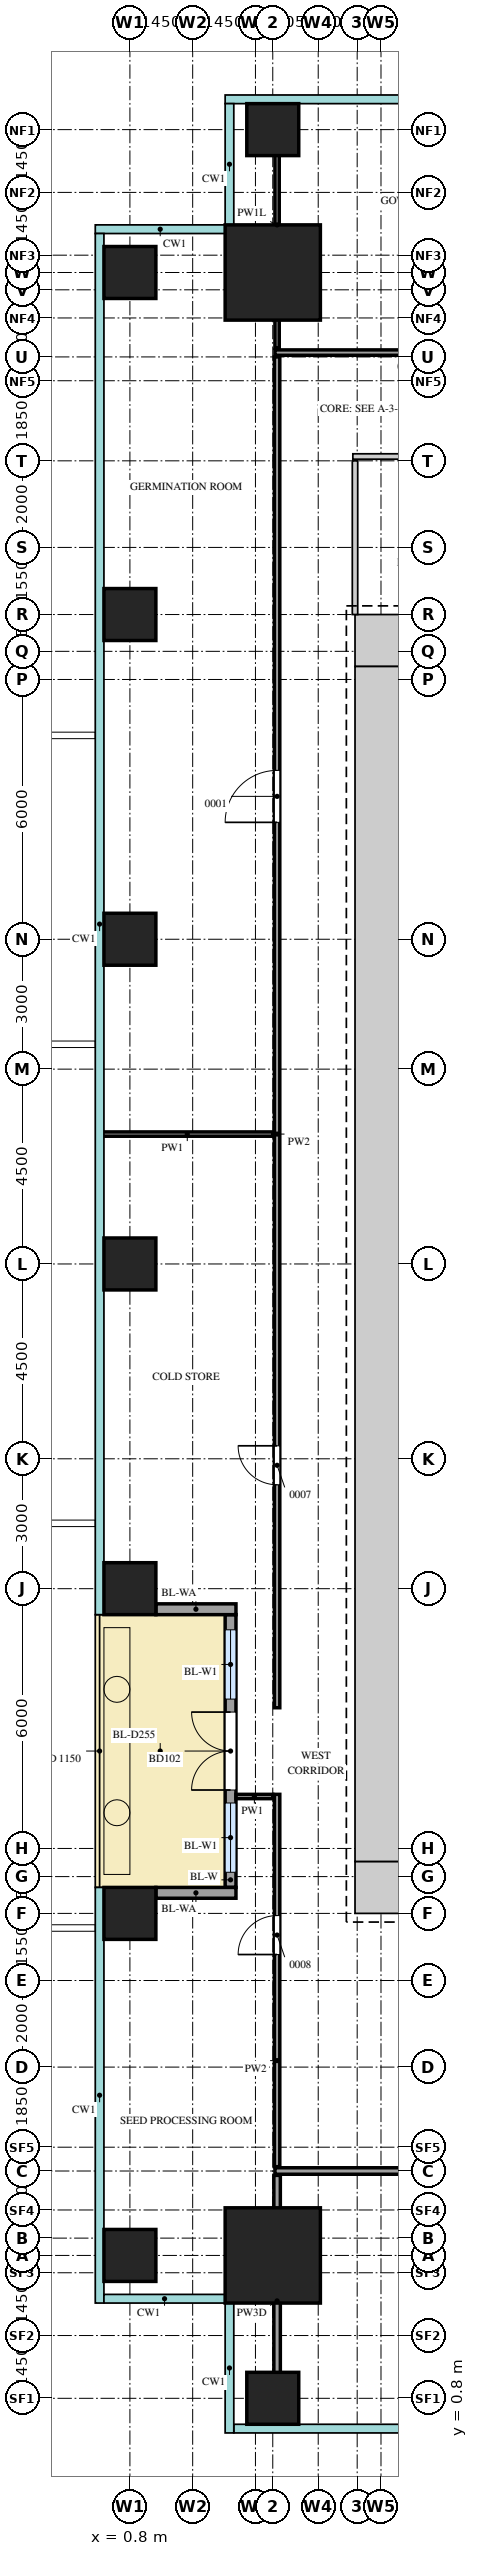
"""IFC4 building model, lengths in metres.
Left out: names, types, materials, properties, quantities, classifications, styles, units other than length and angle.
Written with IfcOpenShell. Run it as: python <this file> out.ifc"""

import sys

from ifc_helpers import new_model, si_unit, direction, frame, frame_2d, origin, origin_2d, place, context, subcontext, project, spatial, rectangle, extrude, source, transform, mapped, element, fill, save


model = new_model("IFC4")
c1 = context("Model", 3, precision=1e-05, world=origin(), true_north=direction((0.0, 1.0)))
c2 = subcontext(c1, "Body", "Model", "MODEL_VIEW")
j1 = project(units=[si_unit("LENGTHUNIT", "METRE"), si_unit("PLANEANGLEUNIT", "RADIAN")], contexts=[c1])
p1 = place(None, origin())
s1 = spatial("IfcSite", under=j1, at=p1, CompositionType="ELEMENT")
p2 = place(p1, origin())
s2 = spatial("IfcBuilding", under=s1, at=p2, CompositionType="ELEMENT")
p3 = place(p2, frame((0.0, 0.0, 51.0)))
s3 = spatial("IfcBuildingStorey", under=s2, at=p3, CompositionType="ELEMENT", Elevation=51.0)
m1 = source(origin(), c2, "Body", "SweptSolid", [
    extrude(rectangle(XDim=1.2, YDim=1.2, at=frame_2d((0.6, 0.0))), origin(), (0.0, 0.0, 1.0), 4.2),
])
for number, where, z_axis, x_axis in (
    (1, (6.0, 41.4, 0.0), (0.0, 0.0, 1.0), (1.0, 0.0, 0.0)),
    (2, (6.0, 12.6, 0.0), (0.0, 0.0, 1.0), (1.0, 0.0, 0.0)),
):
    element("IfcWall", number, at=place(p3, frame(where, z_axis=z_axis, x_axis=x_axis)), inside=s3, PredefinedType="SHEAR", context=c2, shape_type="MappedRepresentation", body=[
        mapped(m1, transform((0.0, 0.0, 0.0))),
    ])
m2 = source(origin(), c2, "Body", "SweptSolid", [
    extrude(rectangle(XDim=27.6, YDim=1.2, at=frame_2d((13.8, 0.0))), origin(), (0.0, 0.0, 1.0), 4.2),
])
p4 = place(p3, frame((6.6, 13.2, 0.0), z_axis=(0.0, 0.0, 1.0), x_axis=(0.0, 1.0, 0.0)))
e3 = element("IfcWall", 3, at=p4, inside=s3, PredefinedType="SHEAR", context=c2, shape_type="MappedRepresentation", body=[
    mapped(m2, transform((0.0, 0.0, 0.0))),
])
m3 = source(origin(), c2, "Body", "SweptSolid", [
    extrude(rectangle(XDim=2.2, YDim=2.2, at=origin_2d()), origin(), (0.0, 0.0, 1.0), 4.5),
])
for number, where, z_axis, x_axis in (
    (4, (4.1, 49.9, 0.0), (0.0, 0.0, 1.0), (1.0, 0.0, 0.0)),
    (5, (4.1, 4.1, 0.0), (0.0, 0.0, 1.0), (1.0, 0.0, 0.0)),
):
    element("IfcColumn", number, at=place(p3, frame(where, z_axis=z_axis, x_axis=x_axis)), inside=s3, PredefinedType="COLUMN", context=c2, shape_type="MappedRepresentation", body=[
        mapped(m3, transform((0.0, 0.0, 0.0))),
    ])
m4 = source(origin(), c2, "Body", "SweptSolid", [
    extrude(rectangle(XDim=1.2, YDim=1.2, at=origin_2d()), origin(), (0.0, 0.0, 1.0), 4.2),
])
for number, where, z_axis, x_axis in (
    (6, (4.1, 0.8, 0.0), (0.0, 0.0, 1.0), (1.0, 0.0, 0.0)),
    (7, (4.1, 53.2, 0.0), (0.0, 0.0, 1.0), (1.0, 0.0, 0.0)),
    (8, (0.8, 4.1, 0.0), (0.0, 0.0, 1.0), (1.0, 0.0, 0.0)),
    (9, (0.8, 12.0, 0.0), (0.0, 0.0, 1.0), (1.0, 0.0, 0.0)),
    (10, (0.8, 19.5, 0.0), (0.0, 0.0, 1.0), (1.0, 0.0, 0.0)),
    (11, (0.8, 27.0, 0.0), (0.0, 0.0, 1.0), (1.0, 0.0, 0.0)),
    (12, (0.8, 34.5, 0.0), (0.0, 0.0, 1.0), (1.0, 0.0, 0.0)),
    (13, (0.8, 42.0, 0.0), (0.0, 0.0, 1.0), (1.0, 0.0, 0.0)),
    (14, (0.8, 49.9, 0.0), (0.0, 0.0, 1.0), (1.0, 0.0, 0.0)),
):
    element("IfcColumn", number, at=place(p3, frame(where, z_axis=z_axis, x_axis=x_axis)), inside=s3, PredefinedType="COLUMN", context=c2, shape_type="MappedRepresentation", body=[
        mapped(m4, transform((0.0, 0.0, 0.0))),
    ])
m5 = source(origin(), c2, "Body", "SweptSolid", [
    extrude(rectangle(XDim=6.3, YDim=0.25, at=frame_2d((3.15, 0.0))), origin(), (0.0, 0.0, 1.0), 4.2),
])
p5 = place(p3, frame((3.125, 12.6, 0.0), z_axis=(0.0, 0.0, 1.0), x_axis=(0.0, 1.0, 0.0)))
e15 = element("IfcWall", 15, at=p5, inside=s3, PredefinedType="SOLIDWALL", context=c2, shape_type="MappedRepresentation", body=[
    mapped(m5, transform((0.0, 0.0, 0.0))),
])
m6 = source(origin(), c2, "Body", "SweptSolid", [
    extrude(rectangle(XDim=1.6, YDim=2.4, at=frame_2d((0.8, 1.2))), frame((0.0, 0.135, 0.0), z_axis=(0.0, -1.0, 0.0), x_axis=(1.0, 0.0, 0.0)), (0.0, 0.0, 1.0), 0.27),
])
p6 = place(p5, frame((0.35, 0.0, 0.0)))
e16 = element("IfcOpeningElement", 16, at=p6, cuts=e15, PredefinedType="OPENING", context=c2, shape_type="MappedRepresentation", body=[
    mapped(m6, transform((0.0, 0.0, 0.0))),
])
p7 = place(p5, frame((4.35, 0.0, 0.0)))
e17 = element("IfcOpeningElement", 17, at=p7, cuts=e15, PredefinedType="OPENING", context=c2, shape_type="MappedRepresentation", body=[
    mapped(m6, transform((0.0, 0.0, 0.0))),
])
m7 = source(origin(), c2, "Body", "SweptSolid", [
    extrude(rectangle(XDim=1.8, YDim=2.4, at=frame_2d((0.9, 1.2))), frame((0.0, 0.135, 0.0), z_axis=(0.0, -1.0, 0.0), x_axis=(1.0, 0.0, 0.0)), (0.0, 0.0, 1.0), 0.27),
])
p8 = place(p5, frame((2.25, 0.0, 0.0)))
e18 = element("IfcOpeningElement", 18, at=p8, cuts=e15, PredefinedType="OPENING", context=c2, shape_type="MappedRepresentation", body=[
    mapped(m7, transform((0.0, 0.0, 0.0))),
])
m8 = source(origin(), c2, "Body", "SweptSolid", [
    extrude(rectangle(XDim=1.85, YDim=0.25, at=frame_2d((0.925, 0.0))), origin(), (0.0, 0.0, 1.0), 3.9),
])
for number, where, z_axis, x_axis in (
    (19, (1.4, 12.475, 0.0), (0.0, 0.0, 1.0), (1.0, 0.0, 0.0)),
    (20, (1.4, 19.025, 0.0), (0.0, 0.0, 1.0), (1.0, 0.0, 0.0)),
):
    element("IfcWall", number, at=place(p3, frame(where, z_axis=z_axis, x_axis=x_axis)), inside=s3, PredefinedType="SOLIDWALL", context=c2, shape_type="MappedRepresentation", body=[
        mapped(m8, transform((0.0, 0.0, 0.0))),
    ])
m9 = source(origin(), c2, "Body", "SweptSolid", [
    extrude(rectangle(XDim=5.8, YDim=0.15, at=frame_2d((2.9, 0.0))), origin(), (0.0, 0.0, 1.0), 3.6),
])
p9 = place(p3, frame((4.2, 0.15, 0.0), z_axis=(0.0, 0.0, 1.0), x_axis=(0.0, 1.0, 0.0)))
e21 = element("IfcWall", 21, at=p9, inside=s3, PredefinedType="PARTITIONING", context=c2, shape_type="MappedRepresentation", body=[
    mapped(m9, transform((0.0, 0.0, 0.0))),
])
m10 = source(origin(), c2, "Body", "SweptSolid", [
    extrude(rectangle(XDim=22.15, YDim=0.15, at=frame_2d((11.075, 0.0))), origin(), (0.0, 0.0, 1.0), 4.3),
])
p10 = place(p3, frame((4.15, 6.05, 0.0), z_axis=(0.0, 0.0, 1.0), x_axis=(1.0, 0.0, 0.0)))
e22 = element("IfcWall", 22, at=p10, inside=s3, PredefinedType="PARTITIONING", context=c2, shape_type="MappedRepresentation", body=[
    mapped(m10, transform((0.0, 0.0, 0.0))),
])
m11 = source(origin(), c2, "Body", "SweptSolid", [
    extrude(rectangle(XDim=1.2, YDim=2.1, at=frame_2d((0.6, 1.05))), frame((0.0, 0.085, 0.0), z_axis=(0.0, -1.0, 0.0), x_axis=(1.0, 0.0, 0.0)), (0.0, 0.0, 1.0), 0.17),
])
p11 = place(p10, frame((9.2, 0.0, 0.0)))
e23 = element("IfcOpeningElement", 23, at=p11, cuts=e22, PredefinedType="OPENING", context=c2, shape_type="MappedRepresentation", body=[
    mapped(m11, transform((0.0, 0.0, 0.0))),
])
m12 = source(origin(), c2, "Body", "SweptSolid", [
    extrude(rectangle(XDim=0.85, YDim=0.1, at=frame_2d((0.425, 0.0))), origin(), (0.0, 0.0, 1.0), 4.3),
])
p12 = place(p3, frame((3.25, 14.7, 0.0), z_axis=(0.0, 0.0, 1.0), x_axis=(1.0, 0.0, 0.0)))
e24 = element("IfcWall", 24, at=p12, inside=s3, PredefinedType="PARTITIONING", context=c2, shape_type="MappedRepresentation", body=[
    mapped(m12, transform((0.0, 0.0, 0.0))),
])
m13 = source(origin(), c2, "Body", "SweptSolid", [
    extrude(rectangle(XDim=3.95, YDim=0.1, at=frame_2d((1.975, 0.0))), origin(), (0.0, 0.0, 1.0), 4.3),
])
p13 = place(p3, frame((0.15, 30.0, 0.0), z_axis=(0.0, 0.0, 1.0), x_axis=(1.0, 0.0, 0.0)))
e25 = element("IfcWall", 25, at=p13, inside=s3, PredefinedType="PARTITIONING", context=c2, shape_type="MappedRepresentation", body=[
    mapped(m13, transform((0.0, 0.0, 0.0))),
])
m14 = source(origin(), c2, "Body", "SweptSolid", [
    extrude(rectangle(XDim=3.55, YDim=0.125, at=frame_2d((1.775, 0.0))), origin(), (0.0, 0.0, 1.0), 4.3),
])
p14 = place(p3, frame((6.0, 42.0, 0.0), z_axis=(0.0, 0.0, 1.0), x_axis=(0.0, 1.0, 0.0)))
e26 = element("IfcWall", 26, at=p14, inside=s3, PredefinedType="PARTITIONING", context=c2, shape_type="MappedRepresentation", body=[
    mapped(m14, transform((0.0, 0.0, 0.0))),
])
m15 = source(origin(), c2, "Body", "SweptSolid", [
    extrude(rectangle(XDim=7.95, YDim=0.125, at=frame_2d((3.975, 0.0))), origin(), (0.0, 0.0, 1.0), 4.3),
])
p15 = place(p3, frame((5.95, 45.65, 0.0), z_axis=(0.0, 0.0, 1.0), x_axis=(1.0, 0.0, 0.0)))
e27 = element("IfcWall", 27, at=p15, inside=s3, PredefinedType="PARTITIONING", context=c2, shape_type="MappedRepresentation", body=[
    mapped(m15, transform((0.0, 0.0, 0.0))),
])
m16 = source(origin(), c2, "Body", "SweptSolid", [
    extrude(rectangle(XDim=0.9, YDim=2.1, at=frame_2d((0.45, 1.05))), frame((0.0, 0.073, 0.0), z_axis=(0.0, -1.0, 0.0), x_axis=(1.0, 0.0, 0.0)), (0.0, 0.0, 1.0), 0.145),
])
p16 = place(p15, frame((1.55, 0.0, 0.0)))
e28 = element("IfcOpeningElement", 28, at=p16, cuts=e27, PredefinedType="OPENING", context=c2, shape_type="MappedRepresentation", body=[
    mapped(m16, transform((0.0, 0.0, 0.0))),
])
p17 = place(p15, frame((5.65, 0.0, 0.0)))
e29 = element("IfcOpeningElement", 29, at=p17, cuts=e27, PredefinedType="OPENING", context=c2, shape_type="MappedRepresentation", body=[
    mapped(m16, transform((0.0, 0.0, 0.0))),
])
m17 = source(origin(), c2, "Body", "SweptSolid", [
    extrude(rectangle(XDim=26.6, YDim=0.125, at=frame_2d((13.3, 0.0))), origin(), (0.0, 0.0, 1.0), 4.3),
])
p18 = place(p3, frame((4.15, 48.05, 0.0), z_axis=(0.0, 0.0, 1.0), x_axis=(1.0, 0.0, 0.0)))
e30 = element("IfcWall", 30, at=p18, inside=s3, PredefinedType="PARTITIONING", context=c2, shape_type="MappedRepresentation", body=[
    mapped(m17, transform((0.0, 0.0, 0.0))),
])
p19 = place(p18, frame((3.5, 0.0, 0.0)))
e31 = element("IfcOpeningElement", 31, at=p19, cuts=e30, PredefinedType="OPENING", context=c2, shape_type="MappedRepresentation", body=[
    mapped(m16, transform((0.0, 0.0, 0.0))),
])
m18 = source(origin(), c2, "Body", "SweptSolid", [
    extrude(rectangle(XDim=1.2, YDim=2.1, at=frame_2d((0.6, 1.05))), frame((0.0, 0.073, 0.0), z_axis=(0.0, -1.0, 0.0), x_axis=(1.0, 0.0, 0.0)), (0.0, 0.0, 1.0), 0.145),
])
p20 = place(p18, frame((16.6, 0.0, 0.0)))
e32 = element("IfcOpeningElement", 32, at=p20, cuts=e30, PredefinedType="OPENING", context=c2, shape_type="MappedRepresentation", body=[
    mapped(m18, transform((0.0, 0.0, 0.0))),
])
m19 = source(origin(), c2, "Body", "SweptSolid", [
    extrude(rectangle(XDim=5.7, YDim=0.1, at=frame_2d((2.85, 0.0))), origin(), (0.0, 0.0, 1.0), 3.6),
])
p21 = place(p3, frame((4.2, 48.15, 0.0), z_axis=(0.0, 0.0, 1.0), x_axis=(0.0, 1.0, 0.0)))
e33 = element("IfcWall", 33, at=p21, inside=s3, PredefinedType="PARTITIONING", context=c2, shape_type="MappedRepresentation", body=[
    mapped(m19, transform((0.0, 0.0, 0.0))),
])
m20 = source(origin(), c2, "Body", "SweptSolid", [
    extrude(rectangle(XDim=8.6, YDim=0.125, at=frame_2d((4.3, 0.0))), origin(), (0.0, 0.0, 1.0), 4.3),
])
p22 = place(p3, frame((4.2, 6.15, 0.0), z_axis=(0.0, 0.0, 1.0), x_axis=(0.0, 1.0, 0.0)))
e34 = element("IfcWall", 34, at=p22, inside=s3, PredefinedType="PARTITIONING", context=c2, shape_type="MappedRepresentation", body=[
    mapped(m20, transform((0.0, 0.0, 0.0))),
])
p23 = place(p22, frame((4.9, 0.0, 0.0)))
e35 = element("IfcOpeningElement", 35, at=p23, cuts=e34, PredefinedType="OPENING", context=c2, shape_type="MappedRepresentation", body=[
    mapped(m16, transform((0.0, 0.0, 0.0))),
])
m21 = source(origin(), c2, "Body", "SweptSolid", [
    extrude(rectangle(XDim=31.2, YDim=0.125, at=frame_2d((15.6, 0.0))), origin(), (0.0, 0.0, 1.0), 4.3),
])
p24 = place(p3, frame((4.2, 16.75, 0.0), z_axis=(0.0, 0.0, 1.0), x_axis=(0.0, 1.0, 0.0)))
e36 = element("IfcWall", 36, at=p24, inside=s3, PredefinedType="PARTITIONING", context=c2, shape_type="MappedRepresentation", body=[
    mapped(m21, transform((0.0, 0.0, 0.0))),
])
p25 = place(p24, frame((5.15, 0.0, 0.0)))
e37 = element("IfcOpeningElement", 37, at=p25, cuts=e36, PredefinedType="OPENING", context=c2, shape_type="MappedRepresentation", body=[
    mapped(m16, transform((0.0, 0.0, 0.0))),
])
p26 = place(p24, frame((20.45, 0.0, 0.0)))
e38 = element("IfcOpeningElement", 38, at=p26, cuts=e36, PredefinedType="OPENING", context=c2, shape_type="MappedRepresentation", body=[
    mapped(m18, transform((0.0, 0.0, 0.0))),
])
m22 = source(origin(), c2, "Body", "SweptSolid", [
    extrude(rectangle(XDim=1.6, YDim=2.4, at=frame_2d((0.8, 1.2))), frame((0.0, 0.03, 0.0), z_axis=(0.0, -1.0, 0.0), x_axis=(1.0, 0.0, 0.0)), (0.0, 0.0, 1.0), 0.06),
])
p27 = place(p6, origin())
e39 = element("IfcWindow", 39, at=p27, inside=s3, PartitioningType="SINGLE_PANEL", PredefinedType="WINDOW", context=c2, shape_type="MappedRepresentation", body=[
    mapped(m22, transform((0.0, 0.0, 0.0))),
])
fill(e16, e39)
p28 = place(p7, origin())
e40 = element("IfcWindow", 40, at=p28, inside=s3, PartitioningType="SINGLE_PANEL", PredefinedType="WINDOW", context=c2, shape_type="MappedRepresentation", body=[
    mapped(m22, transform((0.0, 0.0, 0.0))),
])
fill(e17, e40)
m23 = source(origin(), c2, "Body", "SweptSolid", [
    extrude(rectangle(XDim=1.8, YDim=2.4, at=frame_2d((0.9, 1.2))), frame((0.0, 0.025, 0.0), z_axis=(0.0, -1.0, 0.0), x_axis=(1.0, 0.0, 0.0)), (0.0, 0.0, 1.0), 0.05),
])
p29 = place(p8, origin())
e41 = element("IfcDoor", 41, at=p29, inside=s3, OperationType="DOUBLE_DOOR_DOUBLE_SWING", PredefinedType="DOOR", context=c2, shape_type="MappedRepresentation", body=[
    mapped(m23, transform((0.0, 0.0, 0.0))),
])
fill(e18, e41)
m24 = source(origin(), c2, "Body", "SweptSolid", [
    extrude(rectangle(XDim=0.9, YDim=2.1, at=frame_2d((0.45, 1.05))), frame((0.0, 0.025, 0.0), z_axis=(0.0, -1.0, 0.0), x_axis=(1.0, 0.0, 0.0)), (0.0, 0.0, 1.0), 0.05),
])
p30 = place(p23, origin())
e42 = element("IfcDoor", 42, at=p30, inside=s3, OperationType="SINGLE_SWING_RIGHT", PredefinedType="DOOR", context=c2, shape_type="MappedRepresentation", body=[
    mapped(m24, transform((0.0, 0.0, 0.0))),
])
fill(e35, e42)
p31 = place(p25, origin())
e43 = element("IfcDoor", 43, at=p31, inside=s3, OperationType="SINGLE_SWING_LEFT", PredefinedType="DOOR", context=c2, shape_type="MappedRepresentation", body=[
    mapped(m24, transform((0.0, 0.0, 0.0))),
])
fill(e37, e43)
m25 = source(origin(), c2, "Body", "SweptSolid", [
    extrude(rectangle(XDim=1.2, YDim=2.1, at=frame_2d((0.6, 1.05))), frame((0.0, 0.025, 0.0), z_axis=(0.0, -1.0, 0.0), x_axis=(1.0, 0.0, 0.0)), (0.0, 0.0, 1.0), 0.05),
])
p32 = place(p26, origin())
e44 = element("IfcDoor", 44, at=p32, inside=s3, OperationType="SINGLE_SWING_RIGHT", PredefinedType="DOOR", context=c2, shape_type="MappedRepresentation", body=[
    mapped(m25, transform((0.0, 0.0, 0.0))),
])
fill(e38, e44)
save(model, sys.argv[1])
